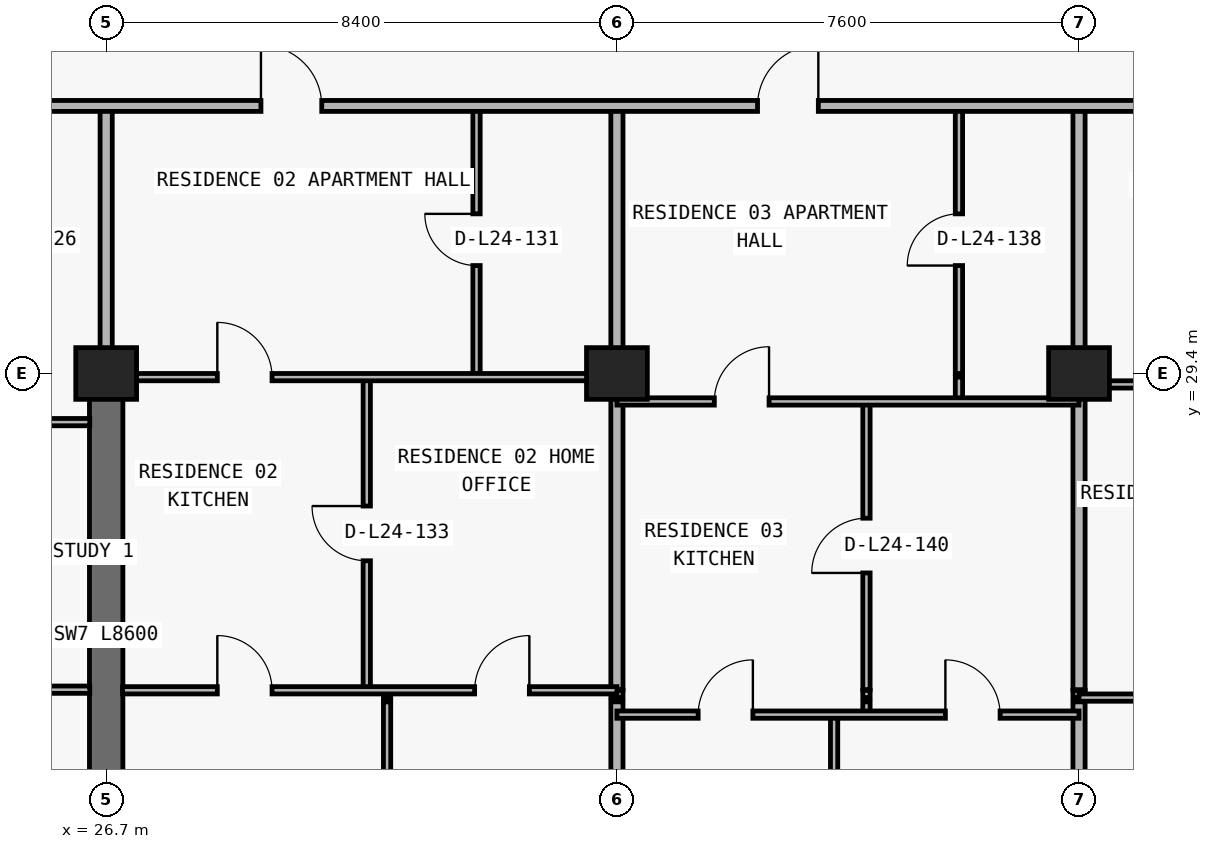
"""IFC4 building model, lengths in metres.
Left out: names, types, materials, properties, quantities, classifications, styles, units other than length and angle.
Written with IfcOpenShell. Run it as: python <this file> out.ifc"""

import sys

from ifc_helpers import new_model, si_unit, direction, frame, frame_2d, origin, origin_2d, place, context, subcontext, project, spatial, rectangle, extrude, element, fill, save


model = new_model("IFC4")
c1 = context("Model", 3, precision=1e-05, world=origin(), true_north=direction((0.0, 1.0)))
c2 = subcontext(c1, "Body", "Model", "MODEL_VIEW")
j1 = project(units=[si_unit("LENGTHUNIT", "METRE"), si_unit("PLANEANGLEUNIT", "RADIAN")], contexts=[c1])
p1 = place(None, origin())
s1 = spatial("IfcSite", under=j1, at=p1, CompositionType="ELEMENT")
p2 = place(p1, origin())
s2 = spatial("IfcBuilding", under=s1, at=p2, CompositionType="ELEMENT")
p3 = place(p2, frame((0.0, 0.0, 91.2)))
s3 = spatial("IfcBuildingStorey", under=s2, at=p3, CompositionType="ELEMENT", Elevation=91.2)
for number, where, z_axis, x_axis in (
    (1, (26.7, 29.4, 0.0), (0.0, 0.0, 1.0), (1.0, 0.0, 0.0)),
    (2, (35.1, 29.4, 0.0), (0.0, 0.0, 1.0), (1.0, 0.0, 0.0)),
    (3, (42.7, 29.4, 0.0), (0.0, 0.0, 1.0), (1.0, 0.0, 0.0)),
):
    element("IfcColumn", number, at=place(p3, frame(where, z_axis=z_axis, x_axis=x_axis)), inside=s3, PredefinedType="COLUMN", context=c2, shape_type="SweptSolid", body=[
        extrude(rectangle(XDim=1.0, YDim=0.85, at=origin_2d()), origin(), (0.0, 0.0, 1.0), 3.05),
    ])
p4 = place(p3, frame((26.7, 20.8, 0.0), z_axis=(0.0, 0.0, 1.0), x_axis=(0.0, 1.0, 0.0)))
e4 = element("IfcWall", 4, at=p4, inside=s3, PredefinedType="SHEAR", context=c2, shape_type="SweptSolid", body=[
    extrude(rectangle(XDim=8.6, YDim=0.55, at=frame_2d((4.3, 0.0))), origin(), (0.0, 0.0, 1.0), 3.05),
])
p5 = place(p3, frame((26.7, 29.405, 0.0), z_axis=(0.0, 0.0, 1.0), x_axis=(0.0, 1.0, 0.0)))
e5 = element("IfcWall", 5, at=p5, inside=s3, PredefinedType="PARTITIONING", context=c2, shape_type="SweptSolid", body=[
    extrude(rectangle(XDim=4.395, YDim=0.2, at=frame_2d((2.198, 0.0))), origin(), (0.0, 0.0, 1.0), 2.335),
])
p6 = place(p3, frame((30.986, 24.2, 0.0), z_axis=(0.0, 0.0, 1.0), x_axis=(0.0, 1.0, 0.0)))
e6 = element("IfcWall", 6, at=p6, inside=s3, PredefinedType="PARTITIONING", context=c2, shape_type="SweptSolid", body=[
    extrude(rectangle(XDim=5.14, YDim=0.12, at=frame_2d((2.57, 0.0))), origin(), (0.0, 0.0, 1.0), 3.05),
])
p7 = place(p6, frame((2.12, 0.0, 0.0)))
e7 = element("IfcOpeningElement", 7, at=p7, cuts=e6, PredefinedType="OPENING", context=c2, shape_type="SweptSolid", body=[
    extrude(rectangle(XDim=0.9, YDim=2.15, at=frame_2d((0.45, 1.075))), frame((0.0, 0.07, 0.0), z_axis=(0.0, -1.0, 0.0), x_axis=(1.0, 0.0, 0.0)), (0.0, 0.0, 1.0), 0.14),
])
p8 = place(p3, frame((31.32, 8.84, 0.0), z_axis=(0.0, 0.0, 1.0), x_axis=(0.0, 1.0, 0.0)))
e8 = element("IfcWall", 8, at=p8, inside=s3, PredefinedType="PARTITIONING", context=c2, shape_type="SweptSolid", body=[
    extrude(rectangle(XDim=15.16, YDim=0.12, at=frame_2d((7.58, 0.0))), origin(), (0.0, 0.0, 1.0), 3.05),
])
p9 = place(p3, frame((31.32, 24.07, 0.0), z_axis=(0.0, 0.0, 1.0), x_axis=(0.0, 1.0, 0.0)))
e9 = element("IfcWall", 9, at=p9, inside=s3, PredefinedType="PARTITIONING", context=c2, shape_type="SweptSolid", body=[
    extrude(rectangle(XDim=0.12, YDim=0.12, at=frame_2d((0.06, 0.0))), origin(), (0.0, 0.0, 1.0), 3.05),
])
p10 = place(p3, frame((32.791, 29.4, 0.0), z_axis=(0.0, 0.0, 1.0), x_axis=(0.0, 1.0, 0.0)))
e10 = element("IfcWall", 10, at=p10, inside=s3, PredefinedType="PARTITIONING", context=c2, shape_type="SweptSolid", body=[
    extrude(rectangle(XDim=4.4, YDim=0.12, at=frame_2d((2.2, 0.0))), origin(), (0.0, 0.0, 1.0), 3.05),
])
p11 = place(p10, frame((1.775, 0.0, 0.0)))
e11 = element("IfcOpeningElement", 11, at=p11, cuts=e10, PredefinedType="OPENING", context=c2, shape_type="SweptSolid", body=[
    extrude(rectangle(XDim=0.85, YDim=2.1, at=frame_2d((0.425, 1.05))), frame((0.0, 0.07, 0.0), z_axis=(0.0, -1.0, 0.0), x_axis=(1.0, 0.0, 0.0)), (0.0, 0.0, 1.0), 0.14),
])
p12 = place(p3, frame((35.1, 8.84, 0.0), z_axis=(0.0, 0.0, 1.0), x_axis=(0.0, 1.0, 0.0)))
e12 = element("IfcWall", 12, at=p12, inside=s3, PredefinedType="PARTITIONING", context=c2, shape_type="SweptSolid", body=[
    extrude(rectangle(XDim=15.16, YDim=0.2, at=frame_2d((7.58, 0.0))), origin(), (0.0, 0.0, 1.0), 2.174),
])
p13 = place(p3, frame((35.1, 24.07, 0.0), z_axis=(0.0, 0.0, 1.0), x_axis=(0.0, 1.0, 0.0)))
e13 = element("IfcWall", 13, at=p13, inside=s3, PredefinedType="PARTITIONING", context=c2, shape_type="SweptSolid", body=[
    extrude(rectangle(XDim=0.12, YDim=0.2, at=frame_2d((0.06, 0.0))), origin(), (0.0, 0.0, 1.0), 2.174),
])
p14 = place(p3, frame((35.1, 24.2, 0.0), z_axis=(0.0, 0.0, 1.0), x_axis=(0.0, 1.0, 0.0)))
e14 = element("IfcWall", 14, at=p14, inside=s3, PredefinedType="PARTITIONING", context=c2, shape_type="SweptSolid", body=[
    extrude(rectangle(XDim=5.14, YDim=0.2, at=frame_2d((2.57, 0.0))), origin(), (0.0, 0.0, 1.0), 2.174),
])
p15 = place(p3, frame((35.1, 29.4, 0.0), z_axis=(0.0, 0.0, 1.0), x_axis=(0.0, 1.0, 0.0)))
e15 = element("IfcWall", 15, at=p15, inside=s3, PredefinedType="PARTITIONING", context=c2, shape_type="SweptSolid", body=[
    extrude(rectangle(XDim=4.4, YDim=0.2, at=frame_2d((2.2, 0.0))), origin(), (0.0, 0.0, 1.0), 2.174),
])
p16 = place(p3, frame((38.672, 8.84, 0.0), z_axis=(0.0, 0.0, 1.0), x_axis=(0.0, 1.0, 0.0)))
e16 = element("IfcWall", 16, at=p16, inside=s3, PredefinedType="PARTITIONING", context=c2, shape_type="SweptSolid", body=[
    extrude(rectangle(XDim=14.95, YDim=0.12, at=frame_2d((7.475, 0.0))), origin(), (0.0, 0.0, 1.0), 3.05),
])
p17 = place(p3, frame((39.204, 23.79, 0.0), z_axis=(0.0, 0.0, 1.0), x_axis=(0.0, 1.0, 0.0)))
e17 = element("IfcWall", 17, at=p17, inside=s3, PredefinedType="PARTITIONING", context=c2, shape_type="SweptSolid", body=[
    extrude(rectangle(XDim=0.21, YDim=0.12, at=frame_2d((0.105, 0.0))), origin(), (0.0, 0.0, 1.0), 3.05),
])
p18 = place(p3, frame((39.204, 24.07, 0.0), z_axis=(0.0, 0.0, 1.0), x_axis=(0.0, 1.0, 0.0)))
e18 = element("IfcWall", 18, at=p18, inside=s3, PredefinedType="PARTITIONING", context=c2, shape_type="SweptSolid", body=[
    extrude(rectangle(XDim=0.12, YDim=0.12, at=frame_2d((0.06, 0.0))), origin(), (0.0, 0.0, 1.0), 3.05),
])
p19 = place(p3, frame((39.204, 24.2, 0.0), z_axis=(0.0, 0.0, 1.0), x_axis=(0.0, 1.0, 0.0)))
e19 = element("IfcWall", 19, at=p19, inside=s3, PredefinedType="PARTITIONING", context=c2, shape_type="SweptSolid", body=[
    extrude(rectangle(XDim=4.74, YDim=0.12, at=frame_2d((2.37, 0.0))), origin(), (0.0, 0.0, 1.0), 3.05),
])
p20 = place(p19, frame((1.92, 0.0, 0.0)))
e20 = element("IfcOpeningElement", 20, at=p20, cuts=e19, PredefinedType="OPENING", context=c2, shape_type="SweptSolid", body=[
    extrude(rectangle(XDim=0.9, YDim=2.15, at=frame_2d((0.45, 1.075))), frame((0.0, 0.07, 0.0), z_axis=(0.0, -1.0, 0.0), x_axis=(1.0, 0.0, 0.0)), (0.0, 0.0, 1.0), 0.14),
])
p21 = place(p3, frame((40.725, 28.94, 0.0), z_axis=(0.0, 0.0, 1.0), x_axis=(0.0, 1.0, 0.0)))
e21 = element("IfcWall", 21, at=p21, inside=s3, PredefinedType="PARTITIONING", context=c2, shape_type="SweptSolid", body=[
    extrude(rectangle(XDim=0.4, YDim=0.12, at=frame_2d((0.2, 0.0))), origin(), (0.0, 0.0, 1.0), 3.05),
])
p22 = place(p3, frame((40.725, 29.4, 0.0), z_axis=(0.0, 0.0, 1.0), x_axis=(0.0, 1.0, 0.0)))
e22 = element("IfcWall", 22, at=p22, inside=s3, PredefinedType="PARTITIONING", context=c2, shape_type="SweptSolid", body=[
    extrude(rectangle(XDim=4.4, YDim=0.12, at=frame_2d((2.2, 0.0))), origin(), (0.0, 0.0, 1.0), 3.05),
])
p23 = place(p22, frame((1.775, 0.0, 0.0)))
e23 = element("IfcOpeningElement", 23, at=p23, cuts=e22, PredefinedType="OPENING", context=c2, shape_type="SweptSolid", body=[
    extrude(rectangle(XDim=0.85, YDim=2.1, at=frame_2d((0.425, 1.05))), frame((0.0, 0.07, 0.0), z_axis=(0.0, -1.0, 0.0), x_axis=(1.0, 0.0, 0.0)), (0.0, 0.0, 1.0), 0.14),
])
p24 = place(p3, frame((42.7, 8.84, 0.0), z_axis=(0.0, 0.0, 1.0), x_axis=(0.0, 1.0, 0.0)))
e24 = element("IfcWall", 24, at=p24, inside=s3, PredefinedType="PARTITIONING", context=c2, shape_type="SweptSolid", body=[
    extrude(rectangle(XDim=15.16, YDim=0.2, at=frame_2d((7.58, 0.0))), origin(), (0.0, 0.0, 1.0), 2.174),
])
p25 = place(p3, frame((42.7, 24.07, 0.0), z_axis=(0.0, 0.0, 1.0), x_axis=(0.0, 1.0, 0.0)))
e25 = element("IfcWall", 25, at=p25, inside=s3, PredefinedType="PARTITIONING", context=c2, shape_type="SweptSolid", body=[
    extrude(rectangle(XDim=0.12, YDim=0.2, at=frame_2d((0.06, 0.0))), origin(), (0.0, 0.0, 1.0), 2.174),
])
p26 = place(p3, frame((42.7, 24.2, 0.0), z_axis=(0.0, 0.0, 1.0), x_axis=(0.0, 1.0, 0.0)))
e26 = element("IfcWall", 26, at=p26, inside=s3, PredefinedType="PARTITIONING", context=c2, shape_type="SweptSolid", body=[
    extrude(rectangle(XDim=5.14, YDim=0.2, at=frame_2d((2.57, 0.0))), origin(), (0.0, 0.0, 1.0), 2.174),
])
p27 = place(p3, frame((42.7, 29.4, 0.0), z_axis=(0.0, 0.0, 1.0), x_axis=(0.0, 1.0, 0.0)))
e27 = element("IfcWall", 27, at=p27, inside=s3, PredefinedType="PARTITIONING", context=c2, shape_type="SweptSolid", body=[
    extrude(rectangle(XDim=4.4, YDim=0.2, at=frame_2d((2.2, 0.0))), origin(), (0.0, 0.0, 1.0), 2.174),
])
p28 = place(p3, frame((35.1, 23.79, 0.0), z_axis=(0.0, 0.0, 1.0), x_axis=(1.0, 0.0, 0.0)))
e28 = element("IfcWall", 28, at=p28, inside=s3, PredefinedType="PARTITIONING", context=c2, shape_type="SweptSolid", body=[
    extrude(rectangle(XDim=7.6, YDim=0.12, at=frame_2d((3.8, 0.0))), origin(), (0.0, 0.0, 1.0), 3.05),
])
p29 = place(p28, frame((1.336, 0.0, 0.0)))
e29 = element("IfcOpeningElement", 29, at=p29, cuts=e28, PredefinedType="OPENING", context=c2, shape_type="SweptSolid", body=[
    extrude(rectangle(XDim=0.9, YDim=2.15, at=frame_2d((0.45, 1.075))), frame((0.0, 0.07, 0.0), z_axis=(0.0, -1.0, 0.0), x_axis=(1.0, 0.0, 0.0)), (0.0, 0.0, 1.0), 0.14),
])
p30 = place(p28, frame((5.402, 0.0, 0.0)))
e30 = element("IfcOpeningElement", 30, at=p30, cuts=e28, PredefinedType="OPENING", context=c2, shape_type="SweptSolid", body=[
    extrude(rectangle(XDim=0.9, YDim=2.15, at=frame_2d((0.45, 1.075))), frame((0.0, 0.07, 0.0), z_axis=(0.0, -1.0, 0.0), x_axis=(1.0, 0.0, 0.0)), (0.0, 0.0, 1.0), 0.14),
])
p31 = place(p3, frame((42.7, 24.07, 0.0), z_axis=(0.0, 0.0, 1.0), x_axis=(1.0, 0.0, 0.0)))
e31 = element("IfcWall", 31, at=p31, inside=s3, PredefinedType="PARTITIONING", context=c2, shape_type="SweptSolid", body=[
    extrude(rectangle(XDim=8.13, YDim=0.12, at=frame_2d((4.065, 0.0))), origin(), (0.0, 0.0, 1.0), 3.05),
])
p32 = place(p31, frame((1.86, 0.0, 0.0)))
e32 = element("IfcOpeningElement", 32, at=p32, cuts=e31, PredefinedType="OPENING", context=c2, shape_type="SweptSolid", body=[
    extrude(rectangle(XDim=0.9, YDim=2.15, at=frame_2d((0.45, 1.075))), frame((0.0, 0.07, 0.0), z_axis=(0.0, -1.0, 0.0), x_axis=(1.0, 0.0, 0.0)), (0.0, 0.0, 1.0), 0.14),
])
p33 = place(p31, frame((6.008, 0.0, 0.0)))
e33 = element("IfcOpeningElement", 33, at=p33, cuts=e31, PredefinedType="OPENING", context=c2, shape_type="SweptSolid", body=[
    extrude(rectangle(XDim=0.9, YDim=2.15, at=frame_2d((0.45, 1.075))), frame((0.0, 0.07, 0.0), z_axis=(0.0, -1.0, 0.0), x_axis=(1.0, 0.0, 0.0)), (0.0, 0.0, 1.0), 0.14),
])
p34 = place(p3, frame((26.97, 24.19, 0.0), z_axis=(0.0, 0.0, 1.0), x_axis=(1.0, 0.0, 0.0)))
e34 = element("IfcWall", 34, at=p34, inside=s3, PredefinedType="PARTITIONING", context=c2, shape_type="SweptSolid", body=[
    extrude(rectangle(XDim=8.13, YDim=0.12, at=frame_2d((4.065, 0.0))), origin(), (0.0, 0.0, 1.0), 3.05),
])
p35 = place(p34, frame((1.558, 0.0, 0.0)))
e35 = element("IfcOpeningElement", 35, at=p35, cuts=e34, PredefinedType="OPENING", context=c2, shape_type="SweptSolid", body=[
    extrude(rectangle(XDim=0.9, YDim=2.15, at=frame_2d((0.45, 1.075))), frame((0.0, 0.07, 0.0), z_axis=(0.0, -1.0, 0.0), x_axis=(1.0, 0.0, 0.0)), (0.0, 0.0, 1.0), 0.14),
])
p36 = place(p34, frame((5.79, 0.0, 0.0)))
e36 = element("IfcOpeningElement", 36, at=p36, cuts=e34, PredefinedType="OPENING", context=c2, shape_type="SweptSolid", body=[
    extrude(rectangle(XDim=0.9, YDim=2.15, at=frame_2d((0.45, 1.075))), frame((0.0, 0.07, 0.0), z_axis=(0.0, -1.0, 0.0), x_axis=(1.0, 0.0, 0.0)), (0.0, 0.0, 1.0), 0.14),
])
p37 = place(p3, frame((18.3, 24.2, 0.0), z_axis=(0.0, 0.0, 1.0), x_axis=(1.0, 0.0, 0.0)))
e37 = element("IfcWall", 37, at=p37, inside=s3, PredefinedType="PARTITIONING", context=c2, shape_type="SweptSolid", body=[
    extrude(rectangle(XDim=8.13, YDim=0.12, at=frame_2d((4.065, 0.0))), origin(), (0.0, 0.0, 1.0), 3.05),
])
p38 = place(p37, frame((3.615, 0.0, 0.0)))
e38 = element("IfcOpeningElement", 38, at=p38, cuts=e37, PredefinedType="OPENING", context=c2, shape_type="SweptSolid", body=[
    extrude(rectangle(XDim=0.9, YDim=2.15, at=frame_2d((0.45, 1.075))), frame((0.0, 0.07, 0.0), z_axis=(0.0, -1.0, 0.0), x_axis=(1.0, 0.0, 0.0)), (0.0, 0.0, 1.0), 0.14),
])
p39 = place(p3, frame((18.3, 28.6, 0.0), z_axis=(0.0, 0.0, 1.0), x_axis=(1.0, 0.0, 0.0)))
e39 = element("IfcWall", 39, at=p39, inside=s3, PredefinedType="PARTITIONING", context=c2, shape_type="SweptSolid", body=[
    extrude(rectangle(XDim=8.13, YDim=0.12, at=frame_2d((4.065, 0.0))), origin(), (0.0, 0.0, 1.0), 3.05),
])
p40 = place(p39, frame((2.827, 0.0, 0.0)))
e40 = element("IfcOpeningElement", 40, at=p40, cuts=e39, PredefinedType="OPENING", context=c2, shape_type="SweptSolid", body=[
    extrude(rectangle(XDim=0.9, YDim=2.15, at=frame_2d((0.45, 1.075))), frame((0.0, 0.07, 0.0), z_axis=(0.0, -1.0, 0.0), x_axis=(1.0, 0.0, 0.0)), (0.0, 0.0, 1.0), 0.14),
])
p41 = place(p3, frame((35.1, 28.94, 0.0), z_axis=(0.0, 0.0, 1.0), x_axis=(1.0, 0.0, 0.0)))
e41 = element("IfcWall", 41, at=p41, inside=s3, PredefinedType="PARTITIONING", context=c2, shape_type="SweptSolid", body=[
    extrude(rectangle(XDim=7.6, YDim=0.12, at=frame_2d((3.8, 0.0))), origin(), (0.0, 0.0, 1.0), 3.05),
])
p42 = place(p41, frame((1.602, 0.0, 0.0)))
e42 = element("IfcOpeningElement", 42, at=p42, cuts=e41, PredefinedType="OPENING", context=c2, shape_type="SweptSolid", body=[
    extrude(rectangle(XDim=0.9, YDim=2.15, at=frame_2d((0.45, 1.075))), frame((0.0, 0.07, 0.0), z_axis=(0.0, -1.0, 0.0), x_axis=(1.0, 0.0, 0.0)), (0.0, 0.0, 1.0), 0.14),
])
p43 = place(p3, frame((42.7, 29.22, 0.0), z_axis=(0.0, 0.0, 1.0), x_axis=(1.0, 0.0, 0.0)))
e43 = element("IfcWall", 43, at=p43, inside=s3, PredefinedType="PARTITIONING", context=c2, shape_type="SweptSolid", body=[
    extrude(rectangle(XDim=8.13, YDim=0.12, at=frame_2d((4.065, 0.0))), origin(), (0.0, 0.0, 1.0), 2.174),
])
p44 = place(p43, frame((1.943, 0.0, 0.0)))
e44 = element("IfcOpeningElement", 44, at=p44, cuts=e43, PredefinedType="OPENING", context=c2, shape_type="SweptSolid", body=[
    extrude(rectangle(XDim=0.9, YDim=2.124, at=frame_2d((0.45, 1.062))), frame((0.0, 0.07, 0.0), z_axis=(0.0, -1.0, 0.0), x_axis=(1.0, 0.0, 0.0)), (0.0, 0.0, 1.0), 0.14),
])
p45 = place(p3, frame((26.97, 29.34, 0.0), z_axis=(0.0, 0.0, 1.0), x_axis=(1.0, 0.0, 0.0)))
e45 = element("IfcWall", 45, at=p45, inside=s3, PredefinedType="PARTITIONING", context=c2, shape_type="SweptSolid", body=[
    extrude(rectangle(XDim=8.13, YDim=0.12, at=frame_2d((4.065, 0.0))), origin(), (0.0, 0.0, 1.0), 2.174),
])
p46 = place(p45, frame((1.558, 0.0, 0.0)))
e46 = element("IfcOpeningElement", 46, at=p46, cuts=e45, PredefinedType="OPENING", context=c2, shape_type="SweptSolid", body=[
    extrude(rectangle(XDim=0.9, YDim=2.124, at=frame_2d((0.45, 1.062))), frame((0.0, 0.07, 0.0), z_axis=(0.0, -1.0, 0.0), x_axis=(1.0, 0.0, 0.0)), (0.0, 0.0, 1.0), 0.14),
])
p47 = place(p3, frame((18.3, 33.8, 0.0), z_axis=(0.0, 0.0, 1.0), x_axis=(1.0, 0.0, 0.0)))
e47 = element("IfcWall", 47, at=p47, inside=s3, PredefinedType="PARTITIONING", context=c2, shape_type="SweptSolid", body=[
    extrude(rectangle(XDim=41.2, YDim=0.18, at=frame_2d((20.6, 0.0))), origin(), (0.0, 0.0, 1.0), 3.05),
])
p48 = place(p47, frame((10.946, 0.0, 0.0)))
e48 = element("IfcOpeningElement", 48, at=p48, cuts=e47, PredefinedType="OPENING", context=c2, shape_type="SweptSolid", body=[
    extrude(rectangle(XDim=1.0, YDim=2.2, at=frame_2d((0.5, 1.1))), frame((0.0, 0.1, 0.0), z_axis=(0.0, -1.0, 0.0), x_axis=(1.0, 0.0, 0.0)), (0.0, 0.0, 1.0), 0.2),
])
p49 = place(p47, frame((19.113, 0.0, 0.0)))
e49 = element("IfcOpeningElement", 49, at=p49, cuts=e47, PredefinedType="OPENING", context=c2, shape_type="SweptSolid", body=[
    extrude(rectangle(XDim=1.0, YDim=2.2, at=frame_2d((0.5, 1.1))), frame((0.0, 0.1, 0.0), z_axis=(0.0, -1.0, 0.0), x_axis=(1.0, 0.0, 0.0)), (0.0, 0.0, 1.0), 0.2),
])
p50 = place(p47, frame((26.976, 0.0, 0.0)))
e50 = element("IfcOpeningElement", 50, at=p50, cuts=e47, PredefinedType="OPENING", context=c2, shape_type="SweptSolid", body=[
    extrude(rectangle(XDim=1.0, YDim=2.2, at=frame_2d((0.5, 1.1))), frame((0.0, 0.1, 0.0), z_axis=(0.0, -1.0, 0.0), x_axis=(1.0, 0.0, 0.0)), (0.0, 0.0, 1.0), 0.2),
])
p51 = place(p47, frame((35.47, 0.0, 0.0)))
e51 = element("IfcOpeningElement", 51, at=p51, cuts=e47, PredefinedType="OPENING", context=c2, shape_type="SweptSolid", body=[
    extrude(rectangle(XDim=1.0, YDim=2.2, at=frame_2d((0.5, 1.1))), frame((0.0, 0.1, 0.0), z_axis=(0.0, -1.0, 0.0), x_axis=(1.0, 0.0, 0.0)), (0.0, 0.0, 1.0), 0.2),
])
p52 = place(p48, origin())
e52 = element("IfcDoor", 52, at=p52, inside=s3, OperationType="SINGLE_SWING_LEFT", PredefinedType="DOOR", context=c2, shape_type="SweptSolid", body=[
    extrude(rectangle(XDim=1.0, YDim=2.2, at=frame_2d((0.5, 1.1))), frame((0.0, 0.025, 0.0), z_axis=(0.0, -1.0, 0.0), x_axis=(1.0, 0.0, 0.0)), (0.0, 0.0, 1.0), 0.05),
])
fill(e48, e52)
p53 = place(p11, origin())
e53 = element("IfcDoor", 53, at=p53, inside=s3, OperationType="SINGLE_SWING_RIGHT", PredefinedType="DOOR", context=c2, shape_type="SweptSolid", body=[
    extrude(rectangle(XDim=0.85, YDim=2.1, at=frame_2d((0.425, 1.05))), frame((0.0, 0.025, 0.0), z_axis=(0.0, -1.0, 0.0), x_axis=(1.0, 0.0, 0.0)), (0.0, 0.0, 1.0), 0.05),
])
fill(e11, e53)
p54 = place(p46, origin())
e54 = element("IfcDoor", 54, at=p54, inside=s3, OperationType="SINGLE_SWING_LEFT", PredefinedType="DOOR", context=c2, shape_type="SweptSolid", body=[
    extrude(rectangle(XDim=0.9, YDim=2.124, at=frame_2d((0.45, 1.062))), frame((0.0, 0.025, 0.0), z_axis=(0.0, -1.0, 0.0), x_axis=(1.0, 0.0, 0.0)), (0.0, 0.0, 1.0), 0.05),
])
fill(e46, e54)
p55 = place(p7, origin())
e55 = element("IfcDoor", 55, at=p55, inside=s3, OperationType="SINGLE_SWING_RIGHT", PredefinedType="DOOR", context=c2, shape_type="SweptSolid", body=[
    extrude(rectangle(XDim=0.9, YDim=2.15, at=frame_2d((0.45, 1.075))), frame((0.0, 0.025, 0.0), z_axis=(0.0, -1.0, 0.0), x_axis=(1.0, 0.0, 0.0)), (0.0, 0.0, 1.0), 0.05),
])
fill(e7, e55)
p56 = place(p35, origin())
e56 = element("IfcDoor", 56, at=p56, inside=s3, OperationType="SINGLE_SWING_LEFT", PredefinedType="DOOR", context=c2, shape_type="SweptSolid", body=[
    extrude(rectangle(XDim=0.9, YDim=2.15, at=frame_2d((0.45, 1.075))), frame((0.0, 0.025, 0.0), z_axis=(0.0, -1.0, 0.0), x_axis=(1.0, 0.0, 0.0)), (0.0, 0.0, 1.0), 0.05),
])
fill(e35, e56)
p57 = place(p36, origin())
e57 = element("IfcDoor", 57, at=p57, inside=s3, OperationType="SINGLE_SWING_RIGHT", PredefinedType="DOOR", context=c2, shape_type="SweptSolid", body=[
    extrude(rectangle(XDim=0.9, YDim=2.15, at=frame_2d((0.45, 1.075))), frame((0.0, 0.025, 0.0), z_axis=(0.0, -1.0, 0.0), x_axis=(1.0, 0.0, 0.0)), (0.0, 0.0, 1.0), 0.05),
])
fill(e36, e57)
p58 = place(p49, origin())
e58 = element("IfcDoor", 58, at=p58, inside=s3, OperationType="SINGLE_SWING_RIGHT", PredefinedType="DOOR", context=c2, shape_type="SweptSolid", body=[
    extrude(rectangle(XDim=1.0, YDim=2.2, at=frame_2d((0.5, 1.1))), frame((0.0, 0.025, 0.0), z_axis=(0.0, -1.0, 0.0), x_axis=(1.0, 0.0, 0.0)), (0.0, 0.0, 1.0), 0.05),
])
fill(e49, e58)
p59 = place(p23, origin())
e59 = element("IfcDoor", 59, at=p59, inside=s3, OperationType="SINGLE_SWING_LEFT", PredefinedType="DOOR", context=c2, shape_type="SweptSolid", body=[
    extrude(rectangle(XDim=0.85, YDim=2.1, at=frame_2d((0.425, 1.05))), frame((0.0, 0.025, 0.0), z_axis=(0.0, -1.0, 0.0), x_axis=(1.0, 0.0, 0.0)), (0.0, 0.0, 1.0), 0.05),
])
fill(e23, e59)
p60 = place(p42, origin())
e60 = element("IfcDoor", 60, at=p60, inside=s3, OperationType="SINGLE_SWING_RIGHT", PredefinedType="DOOR", context=c2, shape_type="SweptSolid", body=[
    extrude(rectangle(XDim=0.9, YDim=2.15, at=frame_2d((0.45, 1.075))), frame((0.0, 0.025, 0.0), z_axis=(0.0, -1.0, 0.0), x_axis=(1.0, 0.0, 0.0)), (0.0, 0.0, 1.0), 0.05),
])
fill(e42, e60)
p61 = place(p20, origin())
e61 = element("IfcDoor", 61, at=p61, inside=s3, OperationType="SINGLE_SWING_LEFT", PredefinedType="DOOR", context=c2, shape_type="SweptSolid", body=[
    extrude(rectangle(XDim=0.9, YDim=2.15, at=frame_2d((0.45, 1.075))), frame((0.0, 0.025, 0.0), z_axis=(0.0, -1.0, 0.0), x_axis=(1.0, 0.0, 0.0)), (0.0, 0.0, 1.0), 0.05),
])
fill(e20, e61)
p62 = place(p29, origin())
e62 = element("IfcDoor", 62, at=p62, inside=s3, OperationType="SINGLE_SWING_RIGHT", PredefinedType="DOOR", context=c2, shape_type="SweptSolid", body=[
    extrude(rectangle(XDim=0.9, YDim=2.15, at=frame_2d((0.45, 1.075))), frame((0.0, 0.025, 0.0), z_axis=(0.0, -1.0, 0.0), x_axis=(1.0, 0.0, 0.0)), (0.0, 0.0, 1.0), 0.05),
])
fill(e29, e62)
p63 = place(p30, origin())
e63 = element("IfcDoor", 63, at=p63, inside=s3, OperationType="SINGLE_SWING_LEFT", PredefinedType="DOOR", context=c2, shape_type="SweptSolid", body=[
    extrude(rectangle(XDim=0.9, YDim=2.15, at=frame_2d((0.45, 1.075))), frame((0.0, 0.025, 0.0), z_axis=(0.0, -1.0, 0.0), x_axis=(1.0, 0.0, 0.0)), (0.0, 0.0, 1.0), 0.05),
])
fill(e30, e63)
save(model, sys.argv[1])
